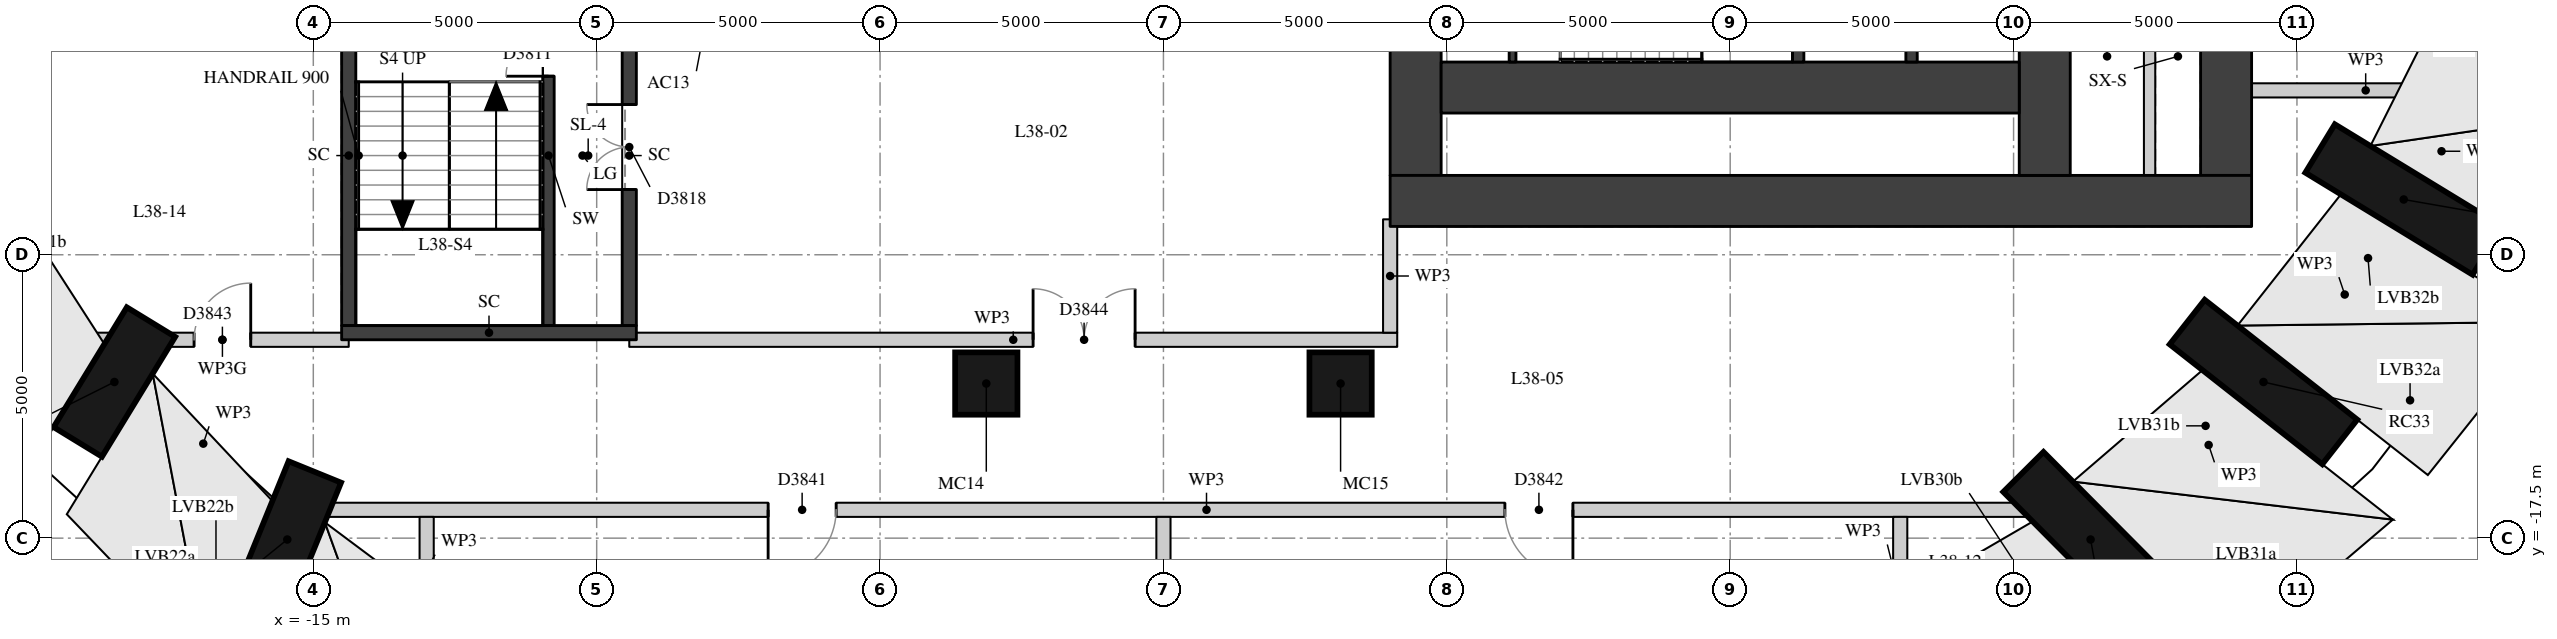
"""IFC4 building model, lengths in metres.
Left out: names, types, materials, properties, quantities, classifications, styles, units other than length and angle.
Written with IfcOpenShell. Run it as: python <this file> out.ifc"""

import sys

from ifc_helpers import new_model, si_unit, direction, frame, frame_2d, origin, origin_2d, place, context, subcontext, project, spatial, rectangle, extrude, element, fill, save


model = new_model("IFC4")
c1 = context("Model", 3, precision=1e-05, world=origin(), true_north=direction((0.0, 1.0)))
c2 = subcontext(c1, "Body", "Model", "MODEL_VIEW")
j1 = project(units=[si_unit("LENGTHUNIT", "METRE"), si_unit("PLANEANGLEUNIT", "RADIAN")], contexts=[c1])
p1 = place(None, origin())
s1 = spatial("IfcSite", under=j1, at=p1, CompositionType="ELEMENT")
p2 = place(p1, origin())
s2 = spatial("IfcBuilding", under=s1, at=p2, CompositionType="ELEMENT")
p3 = place(p2, frame((0.0, 0.0, 135.1)))
s3 = spatial("IfcBuildingStorey", under=s2, at=p3, CompositionType="ELEMENT", Elevation=135.1)
p4 = place(p3, frame((-21.76, -12.425, 0.406), z_axis=(0.353733709576, 0.410333329248, 0.840534961568), x_axis=(-0.548816872063, -0.636631025443, 0.541757305795)))
e1 = element("IfcColumn", 1, at=p4, inside=s3, PredefinedType="COLUMN", context=c2, shape_type="SweptSolid", body=[
    extrude(rectangle(XDim=1.5, YDim=1.0, at=origin_2d()), origin(), (0.0, 0.0, 1.0), 4.387),
])
p5 = place(p3, frame((-19.156, -15.802, 0.42), z_axis=(0.292324702728, 0.478460012403, 0.828023118462), x_axis=(-0.431700053499, -0.706581452145, 0.560693958674)))
e2 = element("IfcColumn", 2, at=p5, inside=s3, PredefinedType="COLUMN", context=c2, shape_type="SweptSolid", body=[
    extrude(rectangle(XDim=1.5, YDim=1.0, at=origin_2d()), origin(), (0.0, 0.0, 1.0), 4.419),
])
p6 = place(p3, frame((-15.945, -18.717, 0.434), z_axis=(0.218097360809, 0.535703698459, 0.815754306557), x_axis=(-0.307597336991, -0.755538858658, 0.578398574803)))
e3 = element("IfcColumn", 3, at=p6, inside=s3, PredefinedType="COLUMN", context=c2, shape_type="SweptSolid", body=[
    extrude(rectangle(XDim=1.5, YDim=1.0, at=origin_2d()), origin(), (0.0, 0.0, 1.0), 4.453),
])
p7 = place(p3, frame((-12.225, -21.082, 0.447), z_axis=(0.133667219248, 0.580294099508, 0.803362827479), x_axis=(-0.180327631599, -0.782862553618, 0.595489855014)))
e4 = element("IfcColumn", 4, at=p7, inside=s3, PredefinedType="COLUMN", context=c2, shape_type="SweptSolid", body=[
    extrude(rectangle(XDim=1.5, YDim=1.0, at=origin_2d()), origin(), (0.0, 0.0, 1.0), 4.49),
])
p8 = place(p3, frame((13.825, -21.082, 0.516), z_axis=(-0.418691163064, 0.545392260871, 0.726116376178), x_axis=(0.442162550921, -0.575966379502, 0.687571820428)))
e5 = element("IfcColumn", 5, at=p8, inside=s3, PredefinedType="COLUMN", context=c2, shape_type="SweptSolid", body=[
    extrude(rectangle(XDim=1.5, YDim=1.0, at=origin_2d()), origin(), (0.0, 0.0, 1.0), 4.777),
])
p9 = place(p3, frame((17.545, -18.717, 0.523), z_axis=(-0.491902569077, 0.494839905534, 0.716355589374), x_axis=(0.505029788662, -0.508045512717, 0.697735386499)))
e6 = element("IfcColumn", 6, at=p9, inside=s3, PredefinedType="COLUMN", context=c2, shape_type="SweptSolid", body=[
    extrude(rectangle(XDim=1.5, YDim=1.0, at=origin_2d()), origin(), (0.0, 0.0, 1.0), 4.821),
])
p10 = place(p3, frame((20.755, -15.802, 0.529), z_axis=(-0.554477984878, 0.435535541863, 0.709128307191), x_axis=(0.557662018939, -0.438036560908, 0.70507945931)))
e7 = element("IfcColumn", 7, at=p10, inside=s3, PredefinedType="COLUMN", context=c2, shape_type="SweptSolid", body=[
    extrude(rectangle(XDim=1.5, YDim=1.0, at=origin_2d()), origin(), (0.0, 0.0, 1.0), 4.854),
])
p11 = place(p3, frame((23.36, -12.425, 0.532), z_axis=(-0.605534186354, 0.369280691149, 0.704953984527), x_axis=(0.601863807785, -0.367042337039, 0.709253043489)))
e8 = element("IfcColumn", 8, at=p11, inside=s3, PredefinedType="COLUMN", context=c2, shape_type="SweptSolid", body=[
    extrude(rectangle(XDim=1.5, YDim=1.0, at=origin_2d()), origin(), (0.0, 0.0, 1.0), 4.875),
])
p12 = place(p3, frame((25.279, -8.689, 0.532), z_axis=(-0.644435668131, 0.297766818618, 0.70429936204), x_axis=(0.639348709963, -0.295416347617, 0.709903098056)))
e9 = element("IfcColumn", 9, at=p12, inside=s3, PredefinedType="COLUMN", context=c2, shape_type="SweptSolid", body=[
    extrude(rectangle(XDim=1.5, YDim=1.0, at=origin_2d()), origin(), (0.0, 0.0, 1.0), 4.878),
])
for number, where, z_axis, x_axis in (
    (10, (-3.126, -14.772, 0.0), (0.0, 0.0, 1.0), (1.0, 0.0, 0.0)),
    (11, (3.126, -14.772, 0.0), (0.0, 0.0, 1.0), (1.0, 0.0, 0.0)),
):
    element("IfcColumn", number, at=place(p3, frame(where, z_axis=z_axis, x_axis=x_axis)), inside=s3, PredefinedType="COLUMN", context=c2, shape_type="SweptSolid", body=[
        extrude(rectangle(XDim=1.1, YDim=1.1, at=origin_2d()), origin(), (0.0, 0.0, 1.0), 4.5),
    ])
p13 = place(p3, frame((4.45, -11.1, 0.0), z_axis=(0.0, 0.0, 1.0), x_axis=(0.0, 1.0, 0.0)))
e12 = element("IfcWall", 12, at=p13, inside=s3, PredefinedType="SHEAR", context=c2, shape_type="SweptSolid", body=[
    extrude(rectangle(XDim=22.2, YDim=0.9, at=frame_2d((11.1, 0.0))), origin(), (0.0, 0.0, 1.0), 4.09),
])
p14 = place(p13, frame((2.35, 0.0, 0.0)))
e13 = element("IfcOpeningElement", 13, at=p14, cuts=e12, PredefinedType="OPENING", context=c2, shape_type="SweptSolid", body=[
    extrude(rectangle(XDim=1.5, YDim=2.1, at=frame_2d((0.75, 1.05))), frame((0.0, 0.46, 0.0), z_axis=(0.0, -1.0, 0.0), x_axis=(1.0, 0.0, 0.0)), (0.0, 0.0, 1.0), 0.92),
])
p15 = place(p13, frame((5.45, 0.0, 0.0)))
e14 = element("IfcOpeningElement", 14, at=p15, cuts=e12, PredefinedType="OPENING", context=c2, shape_type="SweptSolid", body=[
    extrude(rectangle(XDim=1.8, YDim=2.1, at=frame_2d((0.9, 1.05))), frame((0.0, 0.46, 0.0), z_axis=(0.0, -1.0, 0.0), x_axis=(1.0, 0.0, 0.0)), (0.0, 0.0, 1.0), 0.92),
])
p16 = place(p13, frame((7.95, 0.0, 0.0)))
e15 = element("IfcOpeningElement", 15, at=p16, cuts=e12, PredefinedType="OPENING", context=c2, shape_type="SweptSolid", body=[
    extrude(rectangle(XDim=1.1, YDim=2.1, at=frame_2d((0.55, 1.05))), frame((0.0, 0.46, 0.0), z_axis=(0.0, -1.0, 0.0), x_axis=(1.0, 0.0, 0.0)), (0.0, 0.0, 1.0), 0.92),
])
p17 = place(p13, frame((10.6, 0.0, 0.0)))
e16 = element("IfcOpeningElement", 16, at=p17, cuts=e12, PredefinedType="OPENING", context=c2, shape_type="SweptSolid", body=[
    extrude(rectangle(XDim=1.0, YDim=2.1, at=frame_2d((0.5, 1.05))), frame((0.0, 0.46, 0.0), z_axis=(0.0, -1.0, 0.0), x_axis=(1.0, 0.0, 0.0)), (0.0, 0.0, 1.0), 0.92),
])
p18 = place(p13, frame((13.15, 0.0, 0.0)))
e17 = element("IfcOpeningElement", 17, at=p18, cuts=e12, PredefinedType="OPENING", context=c2, shape_type="SweptSolid", body=[
    extrude(rectangle(XDim=1.1, YDim=2.1, at=frame_2d((0.55, 1.05))), frame((0.0, 0.46, 0.0), z_axis=(0.0, -1.0, 0.0), x_axis=(1.0, 0.0, 0.0)), (0.0, 0.0, 1.0), 0.92),
])
p19 = place(p13, frame((14.95, 0.0, 0.0)))
e18 = element("IfcOpeningElement", 18, at=p19, cuts=e12, PredefinedType="OPENING", context=c2, shape_type="SweptSolid", body=[
    extrude(rectangle(XDim=1.8, YDim=2.1, at=frame_2d((0.9, 1.05))), frame((0.0, 0.46, 0.0), z_axis=(0.0, -1.0, 0.0), x_axis=(1.0, 0.0, 0.0)), (0.0, 0.0, 1.0), 0.92),
])
p20 = place(p13, frame((18.35, 0.0, 0.0)))
e19 = element("IfcOpeningElement", 19, at=p20, cuts=e12, PredefinedType="OPENING", context=c2, shape_type="SweptSolid", body=[
    extrude(rectangle(XDim=1.5, YDim=2.1, at=frame_2d((0.75, 1.05))), frame((0.0, 0.46, 0.0), z_axis=(0.0, -1.0, 0.0), x_axis=(1.0, 0.0, 0.0)), (0.0, 0.0, 1.0), 0.92),
])
p21 = place(p3, frame((18.75, -11.1, 0.0), z_axis=(0.0, 0.0, 1.0), x_axis=(0.0, 1.0, 0.0)))
e20 = element("IfcWall", 20, at=p21, inside=s3, PredefinedType="SHEAR", context=c2, shape_type="SweptSolid", body=[
    extrude(rectangle(XDim=22.2, YDim=0.9, at=frame_2d((11.1, 0.0))), origin(), (0.0, 0.0, 1.0), 4.09),
])
p22 = place(p3, frame((4.0, -11.55, 0.0), z_axis=(0.0, 0.0, 1.0), x_axis=(1.0, 0.0, 0.0)))
e21 = element("IfcWall", 21, at=p22, inside=s3, PredefinedType="SHEAR", context=c2, shape_type="SweptSolid", body=[
    extrude(rectangle(XDim=15.2, YDim=0.9, at=frame_2d((7.6, 0.0))), origin(), (0.0, 0.0, 1.0), 4.09),
])
p23 = place(p3, frame((15.55, -11.1, 0.0), z_axis=(0.0, 0.0, 1.0), x_axis=(0.0, 1.0, 0.0)))
e22 = element("IfcWall", 22, at=p23, inside=s3, PredefinedType="SHEAR", context=c2, shape_type="SweptSolid", body=[
    extrude(rectangle(XDim=22.2, YDim=0.9, at=frame_2d((11.1, 0.0))), origin(), (0.0, 0.0, 1.0), 4.09),
])
p24 = place(p23, frame((15.6, 0.0, 0.0)))
e23 = element("IfcOpeningElement", 23, at=p24, cuts=e22, PredefinedType="OPENING", context=c2, shape_type="SweptSolid", body=[
    extrude(rectangle(XDim=1.0, YDim=2.1, at=frame_2d((0.5, 1.05))), frame((0.0, 0.46, 0.0), z_axis=(0.0, -1.0, 0.0), x_axis=(1.0, 0.0, 0.0)), (0.0, 0.0, 1.0), 0.92),
])
p25 = place(p23, frame((5.6, 0.0, 0.0)))
e24 = element("IfcOpeningElement", 24, at=p25, cuts=e22, PredefinedType="OPENING", context=c2, shape_type="SweptSolid", body=[
    extrude(rectangle(XDim=1.0, YDim=2.1, at=frame_2d((0.5, 1.05))), frame((0.0, 0.46, 0.0), z_axis=(0.0, -1.0, 0.0), x_axis=(1.0, 0.0, 0.0)), (0.0, 0.0, 1.0), 0.92),
])
p26 = place(p3, frame((4.9, -9.55, 0.0), z_axis=(0.0, 0.0, 1.0), x_axis=(1.0, 0.0, 0.0)))
e25 = element("IfcWall", 25, at=p26, inside=s3, PredefinedType="SHEAR", context=c2, shape_type="SweptSolid", body=[
    extrude(rectangle(XDim=10.2, YDim=0.9, at=frame_2d((5.1, 0.0))), origin(), (0.0, 0.0, 1.0), 4.09),
])
for number, where, z_axis, x_axis in (
    (26, (11.2, -9.1, 0.0), (0.0, 0.0, 1.0), (0.0, 1.0, 0.0)),
    (27, (13.2, -9.1, 0.0), (0.0, 0.0, 1.0), (0.0, 1.0, 0.0)),
):
    element("IfcWall", number, at=place(p3, frame(where, z_axis=z_axis, x_axis=x_axis)), inside=s3, PredefinedType="SHEAR", context=c2, shape_type="SweptSolid", body=[
        extrude(rectangle(XDim=3.2, YDim=0.2, at=frame_2d((1.6, 0.0))), origin(), (0.0, 0.0, 1.0), 4.09),
    ])
p27 = place(p3, frame((6.16, -9.1, 0.0), z_axis=(0.0, 0.0, 1.0), x_axis=(0.0, 1.0, 0.0)))
e28 = element("IfcWall", 28, at=p27, inside=s3, PredefinedType="SHEAR", context=c2, shape_type="SweptSolid", body=[
    extrude(rectangle(XDim=3.2, YDim=0.12, at=frame_2d((1.6, 0.0))), origin(), (0.0, 0.0, 1.0), 4.09),
])
p28 = place(p27, frame((0.85, 0.0, 0.0)))
e29 = element("IfcOpeningElement", 29, at=p28, cuts=e28, PredefinedType="OPENING", context=c2, shape_type="SweptSolid", body=[
    extrude(rectangle(XDim=1.5, YDim=2.1, at=frame_2d((0.75, 1.05))), frame((0.0, 0.07, 0.0), z_axis=(0.0, -1.0, 0.0), x_axis=(1.0, 0.0, 0.0)), (0.0, 0.0, 1.0), 0.14),
])
p29 = place(p3, frame((-10.85, -13.75, 0.0), z_axis=(0.0, 0.0, 1.0), x_axis=(0.0, 1.0, 0.0)))
e30 = element("IfcWall", 30, at=p29, inside=s3, PredefinedType="SHEAR", context=c2, shape_type="SweptSolid", body=[
    extrude(rectangle(XDim=6.0, YDim=0.2, at=frame_2d((3.0, 0.0))), origin(), (0.0, 0.0, 1.0), 4.09),
])
p30 = place(p29, frame((4.4, 0.0, 0.0)))
e31 = element("IfcOpeningElement", 31, at=p30, cuts=e30, PredefinedType="OPENING", context=c2, shape_type="SweptSolid", body=[
    extrude(rectangle(XDim=1.5, YDim=2.1, at=frame_2d((0.75, 1.05))), frame((0.0, 0.11, 0.0), z_axis=(0.0, -1.0, 0.0), x_axis=(1.0, 0.0, 0.0)), (0.0, 0.0, 1.0), 0.22),
])
p31 = place(p3, frame((17.4, -11.1, 0.0), z_axis=(0.0, 0.0, 1.0), x_axis=(0.0, 1.0, 0.0)))
e32 = element("IfcWall", 32, at=p31, inside=s3, PredefinedType="PARTITIONING", context=c2, shape_type="SweptSolid", body=[
    extrude(rectangle(XDim=4.2, YDim=0.2, at=frame_2d((2.1, 0.0))), origin(), (0.0, 0.0, 1.0), 4.09),
])
p32 = place(p3, frame((-14.375, -13.75, -0.45), z_axis=(0.0, 0.0, 1.0), x_axis=(0.0, 1.0, 0.0)))
e33 = element("IfcWall", 33, at=p32, inside=s3, PredefinedType="SHEAR", context=c2, shape_type="SweptSolid", body=[
    extrude(rectangle(XDim=6.0, YDim=0.25, at=frame_2d((3.0, 0.0))), origin(), (0.0, 0.0, 1.0), 4.54),
])
p33 = place(p3, frame((-9.425, -13.75, -0.45), z_axis=(0.0, 0.0, 1.0), x_axis=(0.0, 1.0, 0.0)))
e34 = element("IfcWall", 34, at=p33, inside=s3, PredefinedType="SHEAR", context=c2, shape_type="SweptSolid", body=[
    extrude(rectangle(XDim=6.0, YDim=0.25, at=frame_2d((3.0, 0.0))), origin(), (0.0, 0.0, 1.0), 4.54),
])
p34 = place(p33, frame((2.4, 0.0, 0.45)))
e35 = element("IfcOpeningElement", 35, at=p34, cuts=e34, PredefinedType="OPENING", context=c2, shape_type="SweptSolid", body=[
    extrude(rectangle(XDim=1.5, YDim=2.1, at=frame_2d((0.75, 1.05))), frame((0.0, 0.135, 0.0), z_axis=(0.0, -1.0, 0.0), x_axis=(1.0, 0.0, 0.0)), (0.0, 0.0, 1.0), 0.27),
])
p35 = place(p3, frame((-14.5, -13.875, -0.45), z_axis=(0.0, 0.0, 1.0), x_axis=(1.0, 0.0, 0.0)))
e36 = element("IfcWall", 36, at=p35, inside=s3, PredefinedType="SHEAR", context=c2, shape_type="SweptSolid", body=[
    extrude(rectangle(XDim=5.2, YDim=0.25, at=frame_2d((2.6, 0.0))), origin(), (0.0, 0.0, 1.0), 4.54),
])
p36 = place(p3, frame((-18.136, -14.744, 0.0), z_axis=(0.0, 0.0, 1.0), x_axis=(0.739013344321, -0.673690787317, 0.0)))
e37 = element("IfcWall", 37, at=p36, inside=s3, PredefinedType="PARTITIONING", context=c2, shape_type="SweptSolid", body=[
    extrude(rectangle(XDim=3.233, YDim=0.25, at=frame_2d((1.616, 0.0))), origin(), (0.0, 0.0, 1.0), 4.09),
])
p37 = place(p3, frame((17.267, -16.922, 0.0), z_axis=(0.0, 0.0, 1.0), x_axis=(0.740778701283, 0.671749146427, 0.0)))
e38 = element("IfcWall", 38, at=p37, inside=s3, PredefinedType="PARTITIONING", context=c2, shape_type="SweptSolid", body=[
    extrude(rectangle(XDim=3.172, YDim=0.25, at=frame_2d((1.586, 0.0))), origin(), (0.0, 0.0, 1.0), 4.09),
])
p38 = place(p3, frame((19.617, -14.791, 0.0), z_axis=(0.0, 0.0, 1.0), x_axis=(0.610891694668, 0.791714176572, 0.0)))
e39 = element("IfcWall", 39, at=p38, inside=s3, PredefinedType="PARTITIONING", context=c2, shape_type="SweptSolid", body=[
    extrude(rectangle(XDim=4.014, YDim=0.25, at=frame_2d((2.007, 0.0))), origin(), (0.0, 0.0, 1.0), 4.09),
])
p39 = place(p3, frame((22.069, -11.613, 0.0), z_axis=(0.0, 0.0, 1.0), x_axis=(0.456718109372, 0.889611470571, 0.0)))
e40 = element("IfcWall", 40, at=p39, inside=s3, PredefinedType="PARTITIONING", context=c2, shape_type="SweptSolid", body=[
    extrude(rectangle(XDim=2.111, YDim=0.25, at=frame_2d((1.055, 0.0))), origin(), (0.0, 0.0, 1.0), 4.09),
])
p40 = place(p3, frame((13.139, -19.726, 0.0), z_axis=(0.0, 0.0, 1.0), x_axis=(0.844455808406, 0.535625230595, 0.0)))
e41 = element("IfcWall", 41, at=p40, inside=s3, PredefinedType="PARTITIONING", context=c2, shape_type="SweptSolid", body=[
    extrude(rectangle(XDim=4.083, YDim=0.25, at=frame_2d((2.042, 0.0))), origin(), (0.0, 0.0, 1.0), 4.09),
])
p41 = place(p3, frame((23.158, -9.491, 0.0), z_axis=(0.0, 0.0, 1.0), x_axis=(0.456707574183, 0.889616879159, 0.0)))
e42 = element("IfcWall", 42, at=p41, inside=s3, PredefinedType="PARTITIONING", context=c2, shape_type="SweptSolid", body=[
    extrude(rectangle(XDim=1.559, YDim=0.25, at=frame_2d((0.78, 0.0))), origin(), (0.0, 0.0, 1.0), 4.09),
])
p42 = place(p3, frame((-15.786, -17.0, 0.0), z_axis=(0.0, 0.0, 1.0), x_axis=(1.0, 0.0, 0.0)))
e43 = element("IfcWall", 43, at=p42, inside=s3, PredefinedType="PARTITIONING", context=c2, shape_type="SweptSolid", body=[
    extrude(rectangle(XDim=33.092, YDim=0.25, at=frame_2d((16.546, 0.0))), origin(), (0.0, 0.0, 1.0), 4.09),
])
p43 = place(p42, frame((8.811, 0.0, 0.0)))
e44 = element("IfcOpeningElement", 44, at=p43, cuts=e43, PredefinedType="OPENING", context=c2, shape_type="SweptSolid", body=[
    extrude(rectangle(XDim=1.2, YDim=2.1, at=frame_2d((0.6, 1.05))), frame((0.0, 0.135, 0.0), z_axis=(0.0, -1.0, 0.0), x_axis=(1.0, 0.0, 0.0)), (0.0, 0.0, 1.0), 0.27),
])
p44 = place(p42, frame((21.811, 0.0, 0.0)))
e45 = element("IfcOpeningElement", 45, at=p44, cuts=e43, PredefinedType="OPENING", context=c2, shape_type="SweptSolid", body=[
    extrude(rectangle(XDim=1.2, YDim=2.1, at=frame_2d((0.6, 1.05))), frame((0.0, 0.135, 0.0), z_axis=(0.0, -1.0, 0.0), x_axis=(1.0, 0.0, 0.0)), (0.0, 0.0, 1.0), 0.27),
])
p45 = place(p3, frame((-18.832, -14.0, 0.0), z_axis=(0.0, 0.0, 1.0), x_axis=(1.0, 0.0, 0.0)))
e46 = element("IfcWall", 46, at=p45, inside=s3, PredefinedType="PARTITIONING", context=c2, shape_type="SweptSolid", body=[
    extrude(rectangle(XDim=4.457, YDim=0.25, at=frame_2d((2.229, 0.0))), origin(), (0.0, 0.0, 1.0), 3.64),
])
p46 = place(p45, frame((1.728, 0.0, 0.0)))
e47 = element("IfcOpeningElement", 47, at=p46, cuts=e46, PredefinedType="OPENING", context=c2, shape_type="SweptSolid", body=[
    extrude(rectangle(XDim=1.0, YDim=2.1, at=frame_2d((0.5, 1.05))), frame((0.0, 0.135, 0.0), z_axis=(0.0, -1.0, 0.0), x_axis=(1.0, 0.0, 0.0)), (0.0, 0.0, 1.0), 0.27),
])
p47 = place(p3, frame((-9.425, -14.0, 0.0), z_axis=(0.0, 0.0, 1.0), x_axis=(1.0, 0.0, 0.0)))
e48 = element("IfcWall", 48, at=p47, inside=s3, PredefinedType="PARTITIONING", context=c2, shape_type="SweptSolid", body=[
    extrude(rectangle(XDim=13.55, YDim=0.25, at=frame_2d((6.775, 0.0))), origin(), (0.0, 0.0, 1.0), 4.09),
])
p48 = place(p47, frame((7.125, 0.0, 0.0)))
e49 = element("IfcOpeningElement", 49, at=p48, cuts=e48, PredefinedType="OPENING", context=c2, shape_type="SweptSolid", body=[
    extrude(rectangle(XDim=1.8, YDim=2.1, at=frame_2d((0.9, 1.05))), frame((0.0, 0.135, 0.0), z_axis=(0.0, -1.0, 0.0), x_axis=(1.0, 0.0, 0.0)), (0.0, 0.0, 1.0), 0.27),
])
p49 = place(p3, frame((19.198, -9.6, 0.0), z_axis=(0.0, 0.0, 1.0), x_axis=(1.0, 0.0, 0.0)))
e50 = element("IfcWall", 50, at=p49, inside=s3, PredefinedType="PARTITIONING", context=c2, shape_type="SweptSolid", body=[
    extrude(rectangle(XDim=4.03, YDim=0.25, at=frame_2d((2.015, 0.0))), origin(), (0.0, 0.0, 1.0), 4.09),
])
p50 = place(p3, frame((-13.0, -18.972, 0.0), z_axis=(0.0, 0.0, 1.0), x_axis=(0.0, 1.0, 0.0)))
e51 = element("IfcWall", 51, at=p50, inside=s3, PredefinedType="PARTITIONING", context=c2, shape_type="SweptSolid", body=[
    extrude(rectangle(XDim=1.847, YDim=0.25, at=frame_2d((0.923, 0.0))), origin(), (0.0, 0.0, 1.0), 4.09),
])
p51 = place(p3, frame((0.0, -22.821, 0.0), z_axis=(0.0, 0.0, 1.0), x_axis=(0.0, 1.0, 0.0)))
e52 = element("IfcWall", 52, at=p51, inside=s3, PredefinedType="PARTITIONING", context=c2, shape_type="SweptSolid", body=[
    extrude(rectangle(XDim=5.696, YDim=0.25, at=frame_2d((2.848, 0.0))), origin(), (0.0, 0.0, 1.0), 3.64),
])
p52 = place(p3, frame((4.0, -13.875, 0.0), z_axis=(0.0, 0.0, 1.0), x_axis=(0.0, 1.0, 0.0)))
e53 = element("IfcWall", 53, at=p52, inside=s3, PredefinedType="PARTITIONING", context=c2, shape_type="SweptSolid", body=[
    extrude(rectangle(XDim=2.0, YDim=0.25, at=frame_2d((1.0, 0.0))), origin(), (0.0, 0.0, 1.0), 4.09),
])
p53 = place(p3, frame((13.0, -19.924, 0.0), z_axis=(0.0, 0.0, 1.0), x_axis=(0.0, 1.0, 0.0)))
e54 = element("IfcWall", 54, at=p53, inside=s3, PredefinedType="PARTITIONING", context=c2, shape_type="SweptSolid", body=[
    extrude(rectangle(XDim=2.799, YDim=0.25, at=frame_2d((1.4, 0.0))), origin(), (0.0, 0.0, 1.0), 4.09),
])
p54 = place(p30, origin())
e55 = element("IfcDoor", 55, at=p54, inside=s3, OperationType="DOUBLE_DOOR_SINGLE_SWING", PredefinedType="DOOR", context=c2, shape_type="SweptSolid", body=[
    extrude(rectangle(XDim=1.5, YDim=2.1, at=frame_2d((0.75, 1.05))), frame((0.0, 0.025, 0.0), z_axis=(0.0, -1.0, 0.0), x_axis=(1.0, 0.0, 0.0)), (0.0, 0.0, 1.0), 0.05),
])
fill(e31, e55)
p55 = place(p34, origin())
e56 = element("IfcDoor", 56, at=p55, inside=s3, OperationType="DOUBLE_DOOR_SINGLE_SWING", PredefinedType="DOOR", context=c2, shape_type="SweptSolid", body=[
    extrude(rectangle(XDim=1.5, YDim=2.1, at=frame_2d((0.75, 1.05))), frame((0.0, 0.025, 0.0), z_axis=(0.0, -1.0, 0.0), x_axis=(1.0, 0.0, 0.0)), (0.0, 0.0, 1.0), 0.05),
])
fill(e35, e56)
p56 = place(p43, origin())
e57 = element("IfcDoor", 57, at=p56, inside=s3, OperationType="SINGLE_SWING_RIGHT", PredefinedType="DOOR", context=c2, shape_type="SweptSolid", body=[
    extrude(rectangle(XDim=1.2, YDim=2.1, at=frame_2d((0.6, 1.05))), frame((0.0, 0.025, 0.0), z_axis=(0.0, -1.0, 0.0), x_axis=(1.0, 0.0, 0.0)), (0.0, 0.0, 1.0), 0.05),
])
fill(e44, e57)
p57 = place(p44, origin())
e58 = element("IfcDoor", 58, at=p57, inside=s3, OperationType="SINGLE_SWING_LEFT", PredefinedType="DOOR", context=c2, shape_type="SweptSolid", body=[
    extrude(rectangle(XDim=1.2, YDim=2.1, at=frame_2d((0.6, 1.05))), frame((0.0, 0.025, 0.0), z_axis=(0.0, -1.0, 0.0), x_axis=(1.0, 0.0, 0.0)), (0.0, 0.0, 1.0), 0.05),
])
fill(e45, e58)
p58 = place(p48, origin())
e59 = element("IfcDoor", 59, at=p58, inside=s3, OperationType="DOUBLE_DOOR_SINGLE_SWING", PredefinedType="DOOR", context=c2, shape_type="SweptSolid", body=[
    extrude(rectangle(XDim=1.8, YDim=2.1, at=frame_2d((0.9, 1.05))), frame((0.0, 0.025, 0.0), z_axis=(0.0, -1.0, 0.0), x_axis=(1.0, 0.0, 0.0)), (0.0, 0.0, 1.0), 0.05),
])
fill(e49, e59)
p59 = place(p46, origin())
e60 = element("IfcDoor", 60, at=p59, inside=s3, OperationType="SINGLE_SWING_RIGHT", PredefinedType="DOOR", context=c2, shape_type="SweptSolid", body=[
    extrude(rectangle(XDim=1.0, YDim=2.1, at=frame_2d((0.5, 1.05))), frame((0.0, 0.025, 0.0), z_axis=(0.0, -1.0, 0.0), x_axis=(1.0, 0.0, 0.0)), (0.0, 0.0, 1.0), 0.05),
])
fill(e47, e60)
save(model, sys.argv[1])
